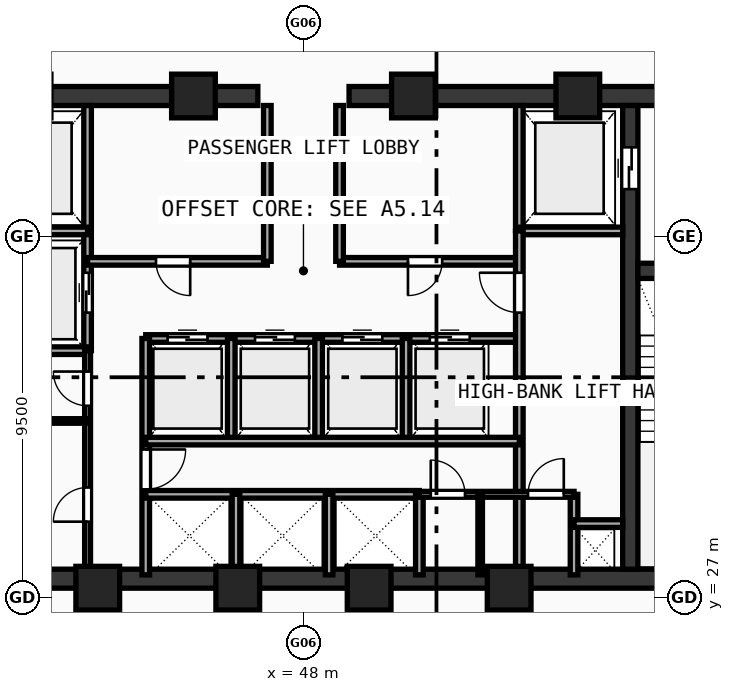
"""IFC4 building model, lengths in metres.
Left out: names, types, materials, properties, quantities, classifications, styles, units other than length and angle.
Written with IfcOpenShell. Run it as: python <this file> out.ifc"""

import sys

from ifc_helpers import new_model, si_unit, direction, frame, frame_2d, origin, origin_with_axes, origin_2d, place, context, subcontext, project, spatial, rectangle, hollow_rectangle, extrude, source, transform, mapped, element, fill, save


model = new_model("IFC4")
c1 = context("Model", 3, precision=1e-05, world=origin(), true_north=direction((0.0, 1.0)))
c2 = subcontext(c1, "Body", "Model", "MODEL_VIEW")
j1 = project(units=[si_unit("LENGTHUNIT", "METRE"), si_unit("PLANEANGLEUNIT", "RADIAN")], contexts=[c1])
p1 = place(None, origin())
s1 = spatial("IfcSite", under=j1, at=p1, CompositionType="ELEMENT")
p2 = place(p1, origin())
s2 = spatial("IfcBuilding", under=s1, at=p2, CompositionType="ELEMENT")
p3 = place(p2, frame((0.0, 0.0, 207.56)))
s3 = spatial("IfcBuildingStorey", under=s2, at=p3, CompositionType="ELEMENT", Elevation=207.56)
p4 = place(p3, frame((35.55, 27.5, 0.0), z_axis=(0.0, 0.0, 1.0), x_axis=(1.0, 0.0, 0.0)))
e1 = element("IfcWall", 1, at=p4, inside=s3, PredefinedType="SHEAR", context=c2, shape_type="SweptSolid", body=[
    extrude(rectangle(XDim=24.9, YDim=0.5, at=frame_2d((12.45, 0.0))), origin(), (0.0, 0.0, 1.0), 3.54),
])
p5 = place(p3, frame((35.55, 40.2, 0.0), z_axis=(0.0, 0.0, 1.0), x_axis=(1.0, 0.0, 0.0)))
e2 = element("IfcWall", 2, at=p5, inside=s3, PredefinedType="SHEAR", context=c2, shape_type="SweptSolid", body=[
    extrude(rectangle(XDim=11.25, YDim=0.5, at=frame_2d((5.625, 0.0))), origin(), (0.0, 0.0, 1.0), 3.54),
])
p6 = place(p5, frame((1.6, 0.0, 0.0)))
e3 = element("IfcOpeningElement", 3, at=p6, cuts=e2, PredefinedType="OPENING", context=c2, shape_type="SweptSolid", body=[
    extrude(rectangle(XDim=1.05, YDim=2.1, at=frame_2d((0.525, 1.05))), frame((0.0, 0.26, 0.0), z_axis=(0.0, -1.0, 0.0), x_axis=(1.0, 0.0, 0.0)), (0.0, 0.0, 1.0), 0.52),
])
p7 = place(p3, frame((49.2, 40.2, 0.0), z_axis=(0.0, 0.0, 1.0), x_axis=(1.0, 0.0, 0.0)))
e4 = element("IfcWall", 4, at=p7, inside=s3, PredefinedType="SHEAR", context=c2, shape_type="SweptSolid", body=[
    extrude(rectangle(XDim=11.25, YDim=0.5, at=frame_2d((5.625, 0.0))), origin(), (0.0, 0.0, 1.0), 3.54),
])
p8 = place(p7, frame((8.6, 0.0, 0.0)))
e5 = element("IfcOpeningElement", 5, at=p8, cuts=e4, PredefinedType="OPENING", context=c2, shape_type="SweptSolid", body=[
    extrude(rectangle(XDim=1.05, YDim=2.1, at=frame_2d((0.525, 1.05))), frame((0.0, 0.26, 0.0), z_axis=(0.0, -1.0, 0.0), x_axis=(1.0, 0.0, 0.0)), (0.0, 0.0, 1.0), 0.52),
])
p9 = place(p3, frame((56.6, 27.75, 0.0), z_axis=(0.0, 0.0, 1.0), x_axis=(0.0, 1.0, 0.0)))
e6 = element("IfcWall", 6, at=p9, inside=s3, PredefinedType="SHEAR", context=c2, shape_type="SweptSolid", body=[
    extrude(rectangle(XDim=12.2, YDim=0.4, at=frame_2d((6.1, 0.0))), origin(), (0.0, 0.0, 1.0), 3.54),
])
p10 = place(p9, frame((10.0, 0.0, 0.0)))
e7 = element("IfcOpeningElement", 7, at=p10, cuts=e6, PredefinedType="OPENING", context=c2, shape_type="SweptSolid", body=[
    extrude(rectangle(XDim=1.1, YDim=2.1, at=frame_2d((0.55, 1.05))), frame((0.0, 0.21, 0.0), z_axis=(0.0, -1.0, 0.0), x_axis=(1.0, 0.0, 0.0)), (0.0, 0.0, 1.0), 0.42),
])
p11 = place(p3, frame((56.8, 35.6, 0.0), z_axis=(0.0, 0.0, 1.0), x_axis=(1.0, 0.0, 0.0)))
e8 = element("IfcWall", 8, at=p11, inside=s3, PredefinedType="SHEAR", context=c2, shape_type="SweptSolid", body=[
    extrude(rectangle(XDim=3.15, YDim=0.4, at=frame_2d((1.575, 0.0))), origin(), (0.0, 0.0, 1.0), 3.54),
])
p12 = place(p11, frame((1.02, 0.0, 0.0)))
e9 = element("IfcOpeningElement", 9, at=p12, cuts=e8, PredefinedType="OPENING", context=c2, shape_type="SweptSolid", body=[
    extrude(rectangle(XDim=1.05, YDim=2.1, at=frame_2d((0.525, 1.05))), frame((0.0, 0.21, 0.0), z_axis=(0.0, -1.0, 0.0), x_axis=(1.0, 0.0, 0.0)), (0.0, 0.0, 1.0), 0.42),
])
m1 = source(origin(), c2, "Body", "SweptSolid", [
    extrude(hollow_rectangle(XDim=1.15, YDim=1.15, WallThickness=0.048, at=origin_2d()), origin(), (0.0, 0.0, 1.0), 3.8),
])
for number, where, z_axis, x_axis in (
    (10, (42.588, 27.25, -0.26), (0.0, 0.0, 1.0), (1.0, 0.0, 0.0)),
    (11, (46.272, 27.25, -0.26), (0.0, 0.0, 1.0), (1.0, 0.0, 0.0)),
    (12, (49.729, 27.25, -0.26), (0.0, 0.0, 1.0), (1.0, 0.0, 0.0)),
    (13, (53.412, 27.25, -0.26), (0.0, 0.0, 1.0), (1.0, 0.0, 0.0)),
    (14, (55.219, 40.2, -0.26), (0.0, 0.0, 1.0), (1.0, 0.0, 0.0)),
    (15, (50.894, 40.2, -0.26), (0.0, 0.0, 1.0), (1.0, 0.0, 0.0)),
    (16, (45.106, 40.2, -0.26), (0.0, 0.0, 1.0), (1.0, 0.0, 0.0)),
):
    element("IfcColumn", number, at=place(p3, frame(where, z_axis=z_axis, x_axis=x_axis)), inside=s3, PredefinedType="COLUMN", context=c2, shape_type="MappedRepresentation", body=[
        mapped(m1, transform((0.0, 0.0, 0.0), scale=1.0)),
    ])
p13 = place(p3, frame((42.32, 33.5, 0.0), z_axis=(0.0, 0.0, 1.0), x_axis=(0.0, 1.0, 0.0)))
e17 = element("IfcWall", 17, at=p13, inside=s3, PredefinedType="SOLIDWALL", context=c2, shape_type="SweptSolid", body=[
    extrude(rectangle(XDim=6.45, YDim=0.2, at=frame_2d((3.225, 0.0))), origin(), (0.0, 0.0, 1.0), 3.54),
])
p14 = place(p13, frame((1.0, 0.0, 0.0)))
e18 = element("IfcOpeningElement", 18, at=p14, cuts=e17, PredefinedType="OPENING", context=c2, shape_type="SweptSolid", body=[
    extrude(rectangle(XDim=1.05, YDim=2.1, at=frame_2d((0.525, 1.05))), frame((0.0, 0.11, 0.0), z_axis=(0.0, -1.0, 0.0), x_axis=(1.0, 0.0, 0.0)), (0.0, 0.0, 1.0), 0.22),
])
for number, where, z_axis, x_axis in (
    (19, (39.6, 36.65, 0.0), (0.0, 0.0, 1.0), (1.0, 0.0, 0.0)),
    (20, (39.6, 33.5, 0.0), (0.0, 0.0, 1.0), (1.0, 0.0, 0.0)),
):
    element("IfcWall", number, at=place(p3, frame(where, z_axis=z_axis, x_axis=x_axis)), inside=s3, PredefinedType="SOLIDWALL", context=c2, shape_type="SweptSolid", body=[
        extrude(rectangle(XDim=2.72, YDim=0.2, at=frame_2d((1.36, 0.0))), origin(), (0.0, 0.0, 1.0), 3.54),
    ])
p15 = place(p3, frame((53.68, 36.65, 0.0), z_axis=(0.0, 0.0, 1.0), x_axis=(0.0, 1.0, 0.0)))
e21 = element("IfcWall", 21, at=p15, inside=s3, PredefinedType="SOLIDWALL", context=c2, shape_type="SweptSolid", body=[
    extrude(rectangle(XDim=3.3, YDim=0.2, at=frame_2d((1.65, 0.0))), origin(), (0.0, 0.0, 1.0), 3.54),
])
p16 = place(p3, frame((53.68, 36.65, 0.0), z_axis=(0.0, 0.0, 1.0), x_axis=(1.0, 0.0, 0.0)))
e22 = element("IfcWall", 22, at=p16, inside=s3, PredefinedType="SOLIDWALL", context=c2, shape_type="SweptSolid", body=[
    extrude(rectangle(XDim=2.72, YDim=0.2, at=frame_2d((1.36, 0.0))), origin(), (0.0, 0.0, 1.0), 3.54),
])
p17 = place(p3, frame((42.32, 35.85, 0.0), z_axis=(0.0, 0.0, 1.0), x_axis=(1.0, 0.0, 0.0)))
e23 = element("IfcWall", 23, at=p17, inside=s3, PredefinedType="SOLIDWALL", context=c2, shape_type="SweptSolid", body=[
    extrude(rectangle(XDim=4.73, YDim=0.2, at=frame_2d((2.365, 0.0))), origin(), (0.0, 0.0, 1.0), 3.54),
])
p18 = place(p17, frame((1.8, 0.0, 0.0)))
e24 = element("IfcOpeningElement", 24, at=p18, cuts=e23, PredefinedType="OPENING", context=c2, shape_type="SweptSolid", body=[
    extrude(rectangle(XDim=0.9, YDim=2.1, at=frame_2d((0.45, 1.05))), frame((0.0, 0.11, 0.0), z_axis=(0.0, -1.0, 0.0), x_axis=(1.0, 0.0, 0.0)), (0.0, 0.0, 1.0), 0.22),
])
p19 = place(p3, frame((48.95, 35.85, 0.0), z_axis=(0.0, 0.0, 1.0), x_axis=(1.0, 0.0, 0.0)))
e25 = element("IfcWall", 25, at=p19, inside=s3, PredefinedType="SOLIDWALL", context=c2, shape_type="SweptSolid", body=[
    extrude(rectangle(XDim=4.73, YDim=0.2, at=frame_2d((2.365, 0.0))), origin(), (0.0, 0.0, 1.0), 3.54),
])
p20 = place(p19, frame((1.8, 0.0, 0.0)))
e26 = element("IfcOpeningElement", 26, at=p20, cuts=e25, PredefinedType="OPENING", context=c2, shape_type="SweptSolid", body=[
    extrude(rectangle(XDim=0.9, YDim=2.1, at=frame_2d((0.45, 1.05))), frame((0.0, 0.11, 0.0), z_axis=(0.0, -1.0, 0.0), x_axis=(1.0, 0.0, 0.0)), (0.0, 0.0, 1.0), 0.22),
])
for number, where, z_axis, x_axis in (
    (27, (47.05, 35.85, 0.0), (0.0, 0.0, 1.0), (0.0, 1.0, 0.0)),
    (28, (48.95, 35.85, 0.0), (0.0, 0.0, 1.0), (0.0, 1.0, 0.0)),
):
    element("IfcWall", number, at=place(p3, frame(where, z_axis=z_axis, x_axis=x_axis)), inside=s3, PredefinedType="SOLIDWALL", context=c2, shape_type="SweptSolid", body=[
        extrude(rectangle(XDim=4.1, YDim=0.2, at=frame_2d((2.05, 0.0))), origin(), (0.0, 0.0, 1.0), 3.54),
    ])
p21 = place(p3, frame((43.85, 33.82, 0.0), z_axis=(0.0, 0.0, 1.0), x_axis=(1.0, 0.0, 0.0)))
e29 = element("IfcWall", 29, at=p21, inside=s3, PredefinedType="SOLIDWALL", context=c2, shape_type="SweptSolid", body=[
    extrude(rectangle(XDim=9.83, YDim=0.2, at=frame_2d((4.915, 0.0))), origin(), (0.0, 0.0, 1.0), 3.54),
])
p22 = place(p21, frame((0.575, 0.0, 0.0)))
e30 = element("IfcOpeningElement", 30, at=p22, cuts=e29, PredefinedType="OPENING", context=c2, shape_type="SweptSolid", body=[
    extrude(rectangle(XDim=1.05, YDim=2.1, at=frame_2d((0.525, 1.05))), frame((0.0, 0.11, 0.0), z_axis=(0.0, -1.0, 0.0), x_axis=(1.0, 0.0, 0.0)), (0.0, 0.0, 1.0), 0.22),
])
p23 = place(p21, frame((2.875, 0.0, 0.0)))
e31 = element("IfcOpeningElement", 31, at=p23, cuts=e29, PredefinedType="OPENING", context=c2, shape_type="SweptSolid", body=[
    extrude(rectangle(XDim=1.05, YDim=2.1, at=frame_2d((0.525, 1.05))), frame((0.0, 0.11, 0.0), z_axis=(0.0, -1.0, 0.0), x_axis=(1.0, 0.0, 0.0)), (0.0, 0.0, 1.0), 0.22),
])
p24 = place(p21, frame((5.175, 0.0, 0.0)))
e32 = element("IfcOpeningElement", 32, at=p24, cuts=e29, PredefinedType="OPENING", context=c2, shape_type="SweptSolid", body=[
    extrude(rectangle(XDim=1.05, YDim=2.1, at=frame_2d((0.525, 1.05))), frame((0.0, 0.11, 0.0), z_axis=(0.0, -1.0, 0.0), x_axis=(1.0, 0.0, 0.0)), (0.0, 0.0, 1.0), 0.22),
])
p25 = place(p21, frame((7.475, 0.0, 0.0)))
e33 = element("IfcOpeningElement", 33, at=p25, cuts=e29, PredefinedType="OPENING", context=c2, shape_type="SweptSolid", body=[
    extrude(rectangle(XDim=1.05, YDim=2.1, at=frame_2d((0.525, 1.05))), frame((0.0, 0.11, 0.0), z_axis=(0.0, -1.0, 0.0), x_axis=(1.0, 0.0, 0.0)), (0.0, 0.0, 1.0), 0.22),
])
p26 = place(p3, frame((43.85, 27.6, 0.0), z_axis=(0.0, 0.0, 1.0), x_axis=(0.0, 1.0, 0.0)))
e34 = element("IfcWall", 34, at=p26, inside=s3, PredefinedType="SOLIDWALL", context=c2, shape_type="SweptSolid", body=[
    extrude(rectangle(XDim=6.22, YDim=0.2, at=frame_2d((3.11, 0.0))), origin(), (0.0, 0.0, 1.0), 3.54),
])
p27 = place(p26, frame((2.25, 0.0, 0.0)))
e35 = element("IfcOpeningElement", 35, at=p27, cuts=e34, PredefinedType="OPENING", context=c2, shape_type="SweptSolid", body=[
    extrude(rectangle(XDim=1.05, YDim=2.1, at=frame_2d((0.525, 1.05))), frame((0.0, 0.11, 0.0), z_axis=(0.0, -1.0, 0.0), x_axis=(1.0, 0.0, 0.0)), (0.0, 0.0, 1.0), 0.22),
])
p28 = place(p3, frame((53.68, 27.6, 0.0), z_axis=(0.0, 0.0, 1.0), x_axis=(0.0, 1.0, 0.0)))
e36 = element("IfcWall", 36, at=p28, inside=s3, PredefinedType="SOLIDWALL", context=c2, shape_type="SweptSolid", body=[
    extrude(rectangle(XDim=9.05, YDim=0.2, at=frame_2d((4.525, 0.0))), origin(), (0.0, 0.0, 1.0), 3.54),
])
p29 = place(p28, frame((6.9, 0.0, 0.0)))
e37 = element("IfcOpeningElement", 37, at=p29, cuts=e36, PredefinedType="OPENING", context=c2, shape_type="SweptSolid", body=[
    extrude(rectangle(XDim=1.05, YDim=2.1, at=frame_2d((0.525, 1.05))), frame((0.0, 0.11, 0.0), z_axis=(0.0, -1.0, 0.0), x_axis=(1.0, 0.0, 0.0)), (0.0, 0.0, 1.0), 0.22),
])
for number, where, z_axis, x_axis in (
    (38, (46.1, 31.12, 0.0), (0.0, 0.0, 1.0), (0.0, 1.0, 0.0)),
    (39, (48.4, 31.12, 0.0), (0.0, 0.0, 1.0), (0.0, 1.0, 0.0)),
    (40, (50.7, 31.12, 0.0), (0.0, 0.0, 1.0), (0.0, 1.0, 0.0)),
):
    element("IfcWall", number, at=place(p3, frame(where, z_axis=z_axis, x_axis=x_axis)), inside=s3, PredefinedType="SOLIDWALL", context=c2, shape_type="SweptSolid", body=[
        extrude(rectangle(XDim=2.7, YDim=0.2, at=frame_2d((1.35, 0.0))), origin(), (0.0, 0.0, 1.0), 3.54),
    ])
p30 = place(p3, frame((43.85, 29.72, 0.0), z_axis=(0.0, 0.0, 1.0), x_axis=(1.0, 0.0, 0.0)))
e41 = element("IfcWall", 41, at=p30, inside=s3, PredefinedType="SOLIDWALL", context=c2, shape_type="SweptSolid", body=[
    extrude(rectangle(XDim=7.2, YDim=0.2, at=frame_2d((3.6, 0.0))), origin(), (0.0, 0.0, 1.0), 3.54),
])
p31 = place(p3, frame((51.05, 27.6, 0.0), z_axis=(0.0, 0.0, 1.0), x_axis=(0.0, 1.0, 0.0)))
e42 = element("IfcWall", 42, at=p31, inside=s3, PredefinedType="SOLIDWALL", context=c2, shape_type="SweptSolid", body=[
    extrude(rectangle(XDim=2.12, YDim=0.2, at=frame_2d((1.06, 0.0))), origin(), (0.0, 0.0, 1.0), 3.54),
])
p32 = place(p3, frame((43.85, 31.12, 0.0), z_axis=(0.0, 0.0, 1.0), x_axis=(1.0, 0.0, 0.0)))
e43 = element("IfcWall", 43, at=p32, inside=s3, PredefinedType="SOLIDWALL", context=c2, shape_type="SweptSolid", body=[
    extrude(rectangle(XDim=9.83, YDim=0.2, at=frame_2d((4.915, 0.0))), origin(), (0.0, 0.0, 1.0), 3.54),
])
for number, where, z_axis, x_axis in (
    (44, (46.225, 27.6, 0.0), (0.0, 0.0, 1.0), (0.0, 1.0, 0.0)),
    (45, (48.675, 27.6, 0.0), (0.0, 0.0, 1.0), (0.0, 1.0, 0.0)),
    (46, (55.12, 27.6, 0.0), (0.0, 0.0, 1.0), (0.0, 1.0, 0.0)),
):
    element("IfcWall", number, at=place(p3, frame(where, z_axis=z_axis, x_axis=x_axis)), inside=s3, PredefinedType="SOLIDWALL", context=c2, shape_type="SweptSolid", body=[
        extrude(rectangle(XDim=2.12, YDim=0.2, at=frame_2d((1.06, 0.0))), origin(), (0.0, 0.0, 1.0), 3.54),
    ])
p33 = place(p3, frame((55.12, 28.95, 0.0), z_axis=(0.0, 0.0, 1.0), x_axis=(1.0, 0.0, 0.0)))
e47 = element("IfcWall", 47, at=p33, inside=s3, PredefinedType="SOLIDWALL", context=c2, shape_type="SweptSolid", body=[
    extrude(rectangle(XDim=1.28, YDim=0.2, at=frame_2d((0.64, 0.0))), origin(), (0.0, 0.0, 1.0), 3.54),
])
p34 = place(p3, frame((42.32, 27.6, 0.0), z_axis=(0.0, 0.0, 1.0), x_axis=(0.0, 1.0, 0.0)))
e48 = element("IfcWall", 48, at=p34, inside=s3, PredefinedType="PARTITIONING", context=c2, shape_type="SweptSolid", body=[
    extrude(rectangle(XDim=5.9, YDim=0.155, at=frame_2d((2.95, 0.0))), origin(), (0.0, 0.0, 1.0), 3.54),
])
p35 = place(p34, frame((1.4, 0.0, 0.0)))
e49 = element("IfcOpeningElement", 49, at=p35, cuts=e48, PredefinedType="OPENING", context=c2, shape_type="SweptSolid", body=[
    extrude(rectangle(XDim=0.9, YDim=2.1, at=frame_2d((0.45, 1.05))), frame((0.0, 0.087, 0.0), z_axis=(0.0, -1.0, 0.0), x_axis=(1.0, 0.0, 0.0)), (0.0, 0.0, 1.0), 0.175),
])
p36 = place(p34, frame((4.45, 0.0, 0.0)))
e50 = element("IfcOpeningElement", 50, at=p36, cuts=e48, PredefinedType="OPENING", context=c2, shape_type="SweptSolid", body=[
    extrude(rectangle(XDim=0.9, YDim=2.1, at=frame_2d((0.45, 1.05))), frame((0.0, 0.087, 0.0), z_axis=(0.0, -1.0, 0.0), x_axis=(1.0, 0.0, 0.0)), (0.0, 0.0, 1.0), 0.175),
])
p37 = place(p3, frame((51.05, 29.72, 0.0), z_axis=(0.0, 0.0, 1.0), x_axis=(1.0, 0.0, 0.0)))
e51 = element("IfcWall", 51, at=p37, inside=s3, PredefinedType="PARTITIONING", context=c2, shape_type="SweptSolid", body=[
    extrude(rectangle(XDim=4.07, YDim=0.155, at=frame_2d((2.035, 0.0))), origin(), (0.0, 0.0, 1.0), 3.54),
])
p38 = place(p37, frame((0.3, 0.0, 0.0)))
e52 = element("IfcOpeningElement", 52, at=p38, cuts=e51, PredefinedType="OPENING", context=c2, shape_type="SweptSolid", body=[
    extrude(rectangle(XDim=0.9, YDim=2.1, at=frame_2d((0.45, 1.05))), frame((0.0, 0.087, 0.0), z_axis=(0.0, -1.0, 0.0), x_axis=(1.0, 0.0, 0.0)), (0.0, 0.0, 1.0), 0.175),
])
p39 = place(p37, frame((2.86, 0.0, 0.0)))
e53 = element("IfcOpeningElement", 53, at=p39, cuts=e51, PredefinedType="OPENING", context=c2, shape_type="SweptSolid", body=[
    extrude(rectangle(XDim=0.94, YDim=2.1, at=frame_2d((0.47, 1.05))), frame((0.0, 0.087, 0.0), z_axis=(0.0, -1.0, 0.0), x_axis=(1.0, 0.0, 0.0)), (0.0, 0.0, 1.0), 0.175),
])
p40 = place(p3, frame((39.6, 31.65, 0.0), z_axis=(0.0, 0.0, 1.0), x_axis=(1.0, 0.0, 0.0)))
e54 = element("IfcWall", 54, at=p40, inside=s3, PredefinedType="PARTITIONING", context=c2, shape_type="SweptSolid", body=[
    extrude(rectangle(XDim=2.72, YDim=0.12, at=frame_2d((1.36, 0.0))), origin(), (0.0, 0.0, 1.0), 3.54),
])
p41 = place(p3, frame((52.65, 27.6, 0.0), z_axis=(0.0, 0.0, 1.0), x_axis=(0.0, 1.0, 0.0)))
e55 = element("IfcWall", 55, at=p41, inside=s3, PredefinedType="PARTITIONING", context=c2, shape_type="SweptSolid", body=[
    extrude(rectangle(XDim=2.12, YDim=0.12, at=frame_2d((1.06, 0.0))), origin(), (0.0, 0.0, 1.0), 3.54),
])
m2 = source(origin(), c2, "Body", "SweptSolid", [
    extrude(rectangle(XDim=1.1, YDim=2.1, at=frame_2d((0.55, 1.05))), frame((0.0, 0.025, 0.0), z_axis=(0.0, -1.0, 0.0), x_axis=(1.0, 0.0, 0.0)), (0.0, 0.0, 1.0), 0.05),
])
p42 = place(p10, origin_with_axes())
e56 = element("IfcDoor", 56, at=p42, inside=s3, OperationType="DOUBLE_DOOR_SLIDING", PredefinedType="DOOR", context=c2, shape_type="MappedRepresentation", body=[
    mapped(m2, transform((0.0, 0.0, 0.0), scale=1.0)),
])
fill(e7, e56)
m3 = source(origin(), c2, "Body", "SweptSolid", [
    extrude(rectangle(XDim=1.05, YDim=2.1, at=frame_2d((0.525, 1.05))), frame((0.0, 0.025, 0.0), z_axis=(0.0, -1.0, 0.0), x_axis=(1.0, 0.0, 0.0)), (0.0, 0.0, 1.0), 0.05),
])
p43 = place(p14, origin_with_axes())
e57 = element("IfcDoor", 57, at=p43, inside=s3, OperationType="DOUBLE_DOOR_SLIDING", PredefinedType="DOOR", context=c2, shape_type="MappedRepresentation", body=[
    mapped(m3, transform((0.0, 0.0, 0.0), scale=1.0)),
])
fill(e18, e57)
m4 = source(origin(), c2, "Body", "SweptSolid", [
    extrude(rectangle(XDim=0.9, YDim=2.1, at=frame_2d((0.45, 1.05))), frame((0.0, 0.025, 0.0), z_axis=(0.0, -1.0, 0.0), x_axis=(1.0, 0.0, 0.0)), (0.0, 0.0, 1.0), 0.05),
])
p44 = place(p18, frame((0.9, 0.0, 0.0), z_axis=(0.0, 0.0, 1.0), x_axis=(-1.0, 0.0, 0.0)))
e58 = element("IfcDoor", 58, at=p44, inside=s3, OperationType="SINGLE_SWING_LEFT", PredefinedType="DOOR", context=c2, shape_type="MappedRepresentation", body=[
    mapped(m4, transform((0.0, 0.0, 0.0), scale=1.0)),
])
fill(e24, e58)
p45 = place(p20, frame((0.9, 0.0, 0.0), z_axis=(0.0, 0.0, 1.0), x_axis=(-1.0, 0.0, 0.0)))
e59 = element("IfcDoor", 59, at=p45, inside=s3, OperationType="SINGLE_SWING_RIGHT", PredefinedType="DOOR", context=c2, shape_type="MappedRepresentation", body=[
    mapped(m4, transform((0.0, 0.0, 0.0), scale=1.0)),
])
fill(e26, e59)
p46 = place(p22, origin_with_axes())
e60 = element("IfcDoor", 60, at=p46, inside=s3, OperationType="DOUBLE_DOOR_SLIDING", PredefinedType="DOOR", context=c2, shape_type="MappedRepresentation", body=[
    mapped(m3, transform((0.0, 0.0, 0.0), scale=1.0)),
])
fill(e30, e60)
p47 = place(p23, origin_with_axes())
e61 = element("IfcDoor", 61, at=p47, inside=s3, OperationType="DOUBLE_DOOR_SLIDING", PredefinedType="DOOR", context=c2, shape_type="MappedRepresentation", body=[
    mapped(m3, transform((0.0, 0.0, 0.0), scale=1.0)),
])
fill(e31, e61)
p48 = place(p24, origin_with_axes())
e62 = element("IfcDoor", 62, at=p48, inside=s3, OperationType="DOUBLE_DOOR_SLIDING", PredefinedType="DOOR", context=c2, shape_type="MappedRepresentation", body=[
    mapped(m3, transform((0.0, 0.0, 0.0), scale=1.0)),
])
fill(e32, e62)
p49 = place(p25, origin_with_axes())
e63 = element("IfcDoor", 63, at=p49, inside=s3, OperationType="DOUBLE_DOOR_SLIDING", PredefinedType="DOOR", context=c2, shape_type="MappedRepresentation", body=[
    mapped(m3, transform((0.0, 0.0, 0.0), scale=1.0)),
])
fill(e33, e63)
p50 = place(p27, frame((1.05, 0.0, 0.0), z_axis=(0.0, 0.0, 1.0), x_axis=(-1.0, 0.0, 0.0)))
e64 = element("IfcDoor", 64, at=p50, inside=s3, OperationType="SINGLE_SWING_LEFT", PredefinedType="DOOR", context=c2, shape_type="MappedRepresentation", body=[
    mapped(m3, transform((0.0, 0.0, 0.0), scale=1.0)),
])
fill(e35, e64)
p51 = place(p29, origin_with_axes())
e65 = element("IfcDoor", 65, at=p51, inside=s3, OperationType="SINGLE_SWING_RIGHT", PredefinedType="DOOR", context=c2, shape_type="MappedRepresentation", body=[
    mapped(m3, transform((0.0, 0.0, 0.0), scale=1.0)),
])
fill(e37, e65)
p52 = place(p35, origin_with_axes())
e66 = element("IfcDoor", 66, at=p52, inside=s3, OperationType="SINGLE_SWING_LEFT", PredefinedType="DOOR", context=c2, shape_type="MappedRepresentation", body=[
    mapped(m4, transform((0.0, 0.0, 0.0), scale=1.0)),
])
fill(e49, e66)
p53 = place(p36, origin_with_axes())
e67 = element("IfcDoor", 67, at=p53, inside=s3, OperationType="SINGLE_SWING_RIGHT", PredefinedType="DOOR", context=c2, shape_type="MappedRepresentation", body=[
    mapped(m4, transform((0.0, 0.0, 0.0), scale=1.0)),
])
fill(e50, e67)
p54 = place(p38, origin_with_axes())
e68 = element("IfcDoor", 68, at=p54, inside=s3, OperationType="SINGLE_SWING_LEFT", PredefinedType="DOOR", context=c2, shape_type="MappedRepresentation", body=[
    mapped(m4, transform((0.0, 0.0, 0.0), scale=1.0)),
])
fill(e52, e68)
m5 = source(origin(), c2, "Body", "SweptSolid", [
    extrude(rectangle(XDim=0.94, YDim=2.1, at=frame_2d((0.47, 1.05))), frame((0.0, 0.025, 0.0), z_axis=(0.0, -1.0, 0.0), x_axis=(1.0, 0.0, 0.0)), (0.0, 0.0, 1.0), 0.05),
])
p55 = place(p39, origin_with_axes())
e69 = element("IfcDoor", 69, at=p55, inside=s3, OperationType="SINGLE_SWING_RIGHT", PredefinedType="DOOR", context=c2, shape_type="MappedRepresentation", body=[
    mapped(m5, transform((0.0, 0.0, 0.0), scale=1.0)),
])
fill(e53, e69)
save(model, sys.argv[1])
